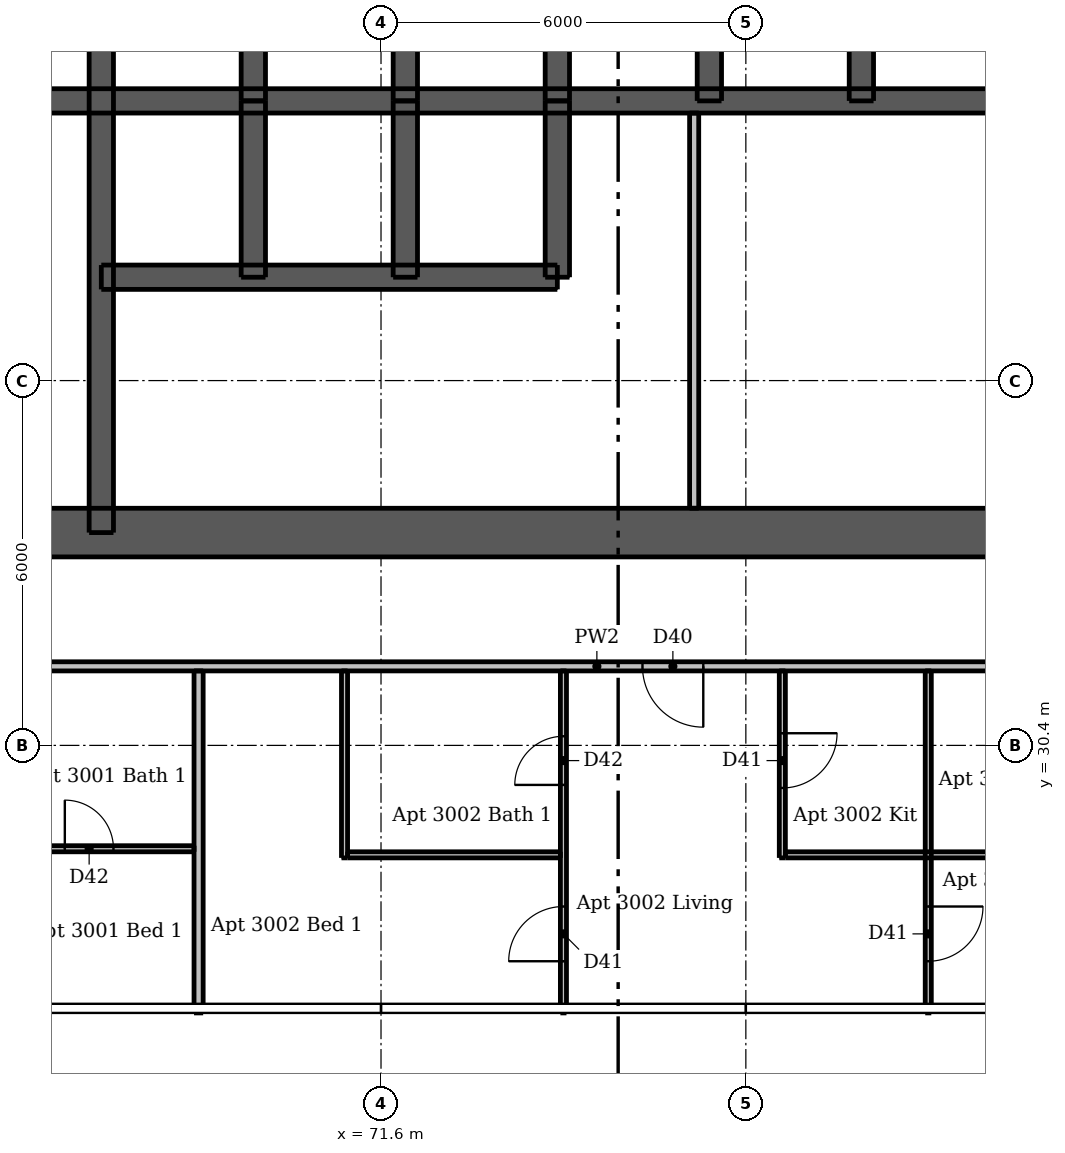
"""IFC4 building model, lengths in metres.
Left out: names, types, materials, properties, quantities, classifications, styles, units other than length and angle.
Written with IfcOpenShell. Run it as: python <this file> out.ifc"""

import sys

from ifc_helpers import new_model, si_unit, direction, frame, frame_2d, origin, place, context, subcontext, project, spatial, rectangle, extrude, element, fill, save


model = new_model("IFC4")
c1 = context("Model", 3, precision=1e-05, world=origin(), true_north=direction((0.0, 1.0)))
c2 = subcontext(c1, "Body", "Model", "MODEL_VIEW")
j1 = project(units=[si_unit("LENGTHUNIT", "METRE"), si_unit("PLANEANGLEUNIT", "RADIAN")], contexts=[c1])
p1 = place(None, origin())
s1 = spatial("IfcSite", under=j1, at=p1, CompositionType="ELEMENT")
p2 = place(p1, origin())
s2 = spatial("IfcBuilding", under=s1, at=p2, CompositionType="ELEMENT")
p3 = place(p2, frame((0.0, 0.0, 111.7)))
s3 = spatial("IfcBuildingStorey", under=s2, at=p3, CompositionType="ELEMENT", Elevation=111.7)
p4 = place(p3, frame((62.5, 33.9, 0.0), z_axis=(0.0, 0.0, 1.0), x_axis=(1.0, 0.0, 0.0)))
e1 = element("IfcWall", 1, at=p4, inside=s3, PredefinedType="SHEAR", context=c2, shape_type="SweptSolid", body=[
    extrude(rectangle(XDim=24.0, YDim=0.8, at=frame_2d((12.0, 0.0))), origin(), (0.0, 0.0, 1.0), 3.05),
])
p5 = place(p4, frame((2.0, 0.0, 0.0)))
e2 = element("IfcOpeningElement", 2, at=p5, cuts=e1, PredefinedType="OPENING", context=c2, shape_type="SweptSolid", body=[
    extrude(rectangle(XDim=1.1, YDim=2.1, at=frame_2d((0.55, 1.05))), frame((0.0, 0.41, 0.0), z_axis=(0.0, -1.0, 0.0), x_axis=(1.0, 0.0, 0.0)), (0.0, 0.0, 1.0), 0.82),
])
p6 = place(p4, frame((20.9, 0.0, 0.0)))
e3 = element("IfcOpeningElement", 3, at=p6, cuts=e1, PredefinedType="OPENING", context=c2, shape_type="SweptSolid", body=[
    extrude(rectangle(XDim=1.1, YDim=2.1, at=frame_2d((0.55, 1.05))), frame((0.0, 0.41, 0.0), z_axis=(0.0, -1.0, 0.0), x_axis=(1.0, 0.0, 0.0)), (0.0, 0.0, 1.0), 0.82),
])
p7 = place(p4, frame((8.0, 0.0, 0.0)))
e4 = element("IfcOpeningElement", 4, at=p7, cuts=e1, PredefinedType="OPENING", context=c2, shape_type="SweptSolid", body=[
    extrude(rectangle(XDim=1.1, YDim=2.1, at=frame_2d((0.55, 1.05))), frame((0.0, 0.41, 0.0), z_axis=(0.0, -1.0, 0.0), x_axis=(1.0, 0.0, 0.0)), (0.0, 0.0, 1.0), 0.82),
])
p8 = place(p4, frame((16.363, 0.0, 0.0)))
e5 = element("IfcOpeningElement", 5, at=p8, cuts=e1, PredefinedType="OPENING", context=c2, shape_type="SweptSolid", body=[
    extrude(rectangle(XDim=0.9, YDim=2.1, at=frame_2d((0.45, 1.05))), frame((0.0, 0.41, 0.0), z_axis=(0.0, -1.0, 0.0), x_axis=(1.0, 0.0, 0.0)), (0.0, 0.0, 1.0), 0.82),
])
p9 = place(p3, frame((62.9, 41.0, 0.0), z_axis=(0.0, 0.0, 1.0), x_axis=(1.0, 0.0, 0.0)))
e6 = element("IfcWall", 6, at=p9, inside=s3, PredefinedType="SHEAR", context=c2, shape_type="SweptSolid", body=[
    extrude(rectangle(XDim=23.2, YDim=0.4, at=frame_2d((11.6, 0.0))), origin(), (0.0, 0.0, 1.0), 3.05),
])
p10 = place(p3, frame((67.0, 33.9, 0.0), z_axis=(0.0, 0.0, 1.0), x_axis=(0.0, 1.0, 0.0)))
e7 = element("IfcWall", 7, at=p10, inside=s3, PredefinedType="SHEAR", context=c2, shape_type="SweptSolid", body=[
    extrude(rectangle(XDim=10.0, YDim=0.4, at=frame_2d((5.0, 0.0))), origin(), (0.0, 0.0, 1.0), 3.05),
])
p11 = place(p10, frame((0.6, 0.0, 0.0)))
e8 = element("IfcOpeningElement", 8, at=p11, cuts=e7, PredefinedType="OPENING", context=c2, shape_type="SweptSolid", body=[
    extrude(rectangle(XDim=1.1, YDim=2.1, at=frame_2d((0.55, 1.05))), frame((0.0, 0.21, 0.0), z_axis=(0.0, -1.0, 0.0), x_axis=(1.0, 0.0, 0.0)), (0.0, 0.0, 1.0), 0.42),
])
for number, where, z_axis, x_axis in (
    (9, (69.5, 41.0, 0.0), (0.0, 0.0, 1.0), (0.0, 1.0, 0.0)),
    (10, (72.0, 41.0, 0.0), (0.0, 0.0, 1.0), (0.0, 1.0, 0.0)),
    (11, (74.5, 41.0, 0.0), (0.0, 0.0, 1.0), (0.0, 1.0, 0.0)),
    (12, (77.0, 41.0, 0.0), (0.0, 0.0, 1.0), (0.0, 1.0, 0.0)),
    (13, (79.5, 41.0, 0.0), (0.0, 0.0, 1.0), (0.0, 1.0, 0.0)),
):
    element("IfcWall", number, at=place(p3, frame(where, z_axis=z_axis, x_axis=x_axis)), inside=s3, PredefinedType="SHEAR", context=c2, shape_type="SweptSolid", body=[
        extrude(rectangle(XDim=2.9, YDim=0.4, at=frame_2d((1.45, 0.0))), origin(), (0.0, 0.0, 1.0), 3.05),
    ])
p12 = place(p3, frame((67.0, 38.1, 0.0), z_axis=(0.0, 0.0, 1.0), x_axis=(1.0, 0.0, 0.0)))
e14 = element("IfcWall", 14, at=p12, inside=s3, PredefinedType="SHEAR", context=c2, shape_type="SweptSolid", body=[
    extrude(rectangle(XDim=7.5, YDim=0.4, at=frame_2d((3.75, 0.0))), origin(), (0.0, 0.0, 1.0), 3.05),
])
p13 = place(p12, frame((0.7, 0.0, 0.0)))
e15 = element("IfcOpeningElement", 15, at=p13, cuts=e14, PredefinedType="OPENING", context=c2, shape_type="SweptSolid", body=[
    extrude(rectangle(XDim=1.1, YDim=2.1, at=frame_2d((0.55, 1.05))), frame((0.0, 0.21, 0.0), z_axis=(0.0, -1.0, 0.0), x_axis=(1.0, 0.0, 0.0)), (0.0, 0.0, 1.0), 0.42),
])
p14 = place(p12, frame((3.2, 0.0, 0.0)))
e16 = element("IfcOpeningElement", 16, at=p14, cuts=e14, PredefinedType="OPENING", context=c2, shape_type="SweptSolid", body=[
    extrude(rectangle(XDim=1.1, YDim=2.1, at=frame_2d((0.55, 1.05))), frame((0.0, 0.21, 0.0), z_axis=(0.0, -1.0, 0.0), x_axis=(1.0, 0.0, 0.0)), (0.0, 0.0, 1.0), 0.42),
])
p15 = place(p12, frame((5.65, 0.0, 0.0)))
e17 = element("IfcOpeningElement", 17, at=p15, cuts=e14, PredefinedType="OPENING", context=c2, shape_type="SweptSolid", body=[
    extrude(rectangle(XDim=1.2, YDim=2.1, at=frame_2d((0.6, 1.05))), frame((0.0, 0.21, 0.0), z_axis=(0.0, -1.0, 0.0), x_axis=(1.0, 0.0, 0.0)), (0.0, 0.0, 1.0), 0.42),
])
for number, where, z_axis, x_axis in (
    (18, (69.5, 38.1, 0.0), (0.0, 0.0, 1.0), (0.0, 1.0, 0.0)),
    (19, (72.0, 38.1, 0.0), (0.0, 0.0, 1.0), (0.0, 1.0, 0.0)),
    (20, (74.5, 38.1, 0.0), (0.0, 0.0, 1.0), (0.0, 1.0, 0.0)),
):
    element("IfcWall", number, at=place(p3, frame(where, z_axis=z_axis, x_axis=x_axis)), inside=s3, PredefinedType="SHEAR", context=c2, shape_type="SweptSolid", body=[
        extrude(rectangle(XDim=2.9, YDim=0.4, at=frame_2d((1.45, 0.0))), origin(), (0.0, 0.0, 1.0), 3.05),
    ])
p16 = place(p3, frame((76.75, 34.3, 0.0), z_axis=(0.0, 0.0, 1.0), x_axis=(0.0, 1.0, 0.0)))
e21 = element("IfcWall", 21, at=p16, inside=s3, PredefinedType="PLUMBINGWALL", context=c2, shape_type="SweptSolid", body=[
    extrude(rectangle(XDim=6.5, YDim=0.15, at=frame_2d((3.25, 0.0))), origin(), (0.0, 0.0, 1.0), 3.05),
])
p17 = place(p3, frame((71.0, 28.55, 0.0), z_axis=(0.0, 0.0, 1.0), x_axis=(0.0, 1.0, 0.0)))
e22 = element("IfcWall", 22, at=p17, inside=s3, PredefinedType="PARTITIONING", context=c2, shape_type="SweptSolid", body=[
    extrude(rectangle(XDim=3.075, YDim=0.1, at=frame_2d((1.538, 0.0))), origin(), (0.0, 0.0, 1.0), 3.05),
])
p18 = place(p3, frame((74.6, 26.0, 0.0), z_axis=(0.0, 0.0, 1.0), x_axis=(0.0, 1.0, 0.0)))
e23 = element("IfcWall", 23, at=p18, inside=s3, PredefinedType="PARTITIONING", context=c2, shape_type="SweptSolid", body=[
    extrude(rectangle(XDim=5.625, YDim=0.1, at=frame_2d((2.812, 0.0))), origin(), (0.0, 0.0, 1.0), 3.05),
])
p19 = place(p18, frame((0.85, 0.0, 0.0)))
e24 = element("IfcOpeningElement", 24, at=p19, cuts=e23, PredefinedType="OPENING", context=c2, shape_type="SweptSolid", body=[
    extrude(rectangle(XDim=0.9, YDim=2.1, at=frame_2d((0.45, 1.05))), frame((0.0, 0.06, 0.0), z_axis=(0.0, -1.0, 0.0), x_axis=(1.0, 0.0, 0.0)), (0.0, 0.0, 1.0), 0.12),
])
p20 = place(p18, frame((3.75, 0.0, 0.0)))
e25 = element("IfcOpeningElement", 25, at=p20, cuts=e23, PredefinedType="OPENING", context=c2, shape_type="SweptSolid", body=[
    extrude(rectangle(XDim=0.8, YDim=2.1, at=frame_2d((0.4, 1.05))), frame((0.0, 0.06, 0.0), z_axis=(0.0, -1.0, 0.0), x_axis=(1.0, 0.0, 0.0)), (0.0, 0.0, 1.0), 0.12),
])
p21 = place(p3, frame((78.2, 31.625, 0.0), z_axis=(0.0, 0.0, 1.0), x_axis=(0.0, -1.0, 0.0)))
e26 = element("IfcWall", 26, at=p21, inside=s3, PredefinedType="PARTITIONING", context=c2, shape_type="SweptSolid", body=[
    extrude(rectangle(XDim=3.075, YDim=0.1, at=frame_2d((1.538, 0.0))), origin(), (0.0, 0.0, 1.0), 3.05),
])
p22 = place(p21, frame((1.025, 0.0, 0.0)))
e27 = element("IfcOpeningElement", 27, at=p22, cuts=e26, PredefinedType="OPENING", context=c2, shape_type="SweptSolid", body=[
    extrude(rectangle(XDim=0.9, YDim=2.1, at=frame_2d((0.45, 1.05))), frame((0.0, 0.06, 0.0), z_axis=(0.0, -1.0, 0.0), x_axis=(1.0, 0.0, 0.0)), (0.0, 0.0, 1.0), 0.12),
])
p23 = place(p3, frame((80.6, 31.625, 0.0), z_axis=(0.0, 0.0, 1.0), x_axis=(0.0, -1.0, 0.0)))
e28 = element("IfcWall", 28, at=p23, inside=s3, PredefinedType="PARTITIONING", context=c2, shape_type="SweptSolid", body=[
    extrude(rectangle(XDim=5.625, YDim=0.1, at=frame_2d((2.812, 0.0))), origin(), (0.0, 0.0, 1.0), 3.05),
])
p24 = place(p23, frame((3.875, 0.0, 0.0)))
e29 = element("IfcOpeningElement", 29, at=p24, cuts=e28, PredefinedType="OPENING", context=c2, shape_type="SweptSolid", body=[
    extrude(rectangle(XDim=0.9, YDim=2.1, at=frame_2d((0.45, 1.05))), frame((0.0, 0.06, 0.0), z_axis=(0.0, -1.0, 0.0), x_axis=(1.0, 0.0, 0.0)), (0.0, 0.0, 1.0), 0.12),
])
p25 = place(p3, frame((62.65, 28.7, 0.0), z_axis=(0.0, 0.0, 1.0), x_axis=(1.0, 0.0, 0.0)))
e30 = element("IfcWall", 30, at=p25, inside=s3, PredefinedType="PARTITIONING", context=c2, shape_type="SweptSolid", body=[
    extrude(rectangle(XDim=5.875, YDim=0.1, at=frame_2d((2.938, 0.0))), origin(), (0.0, 0.0, 1.0), 3.05),
])
p26 = place(p25, frame((3.75, 0.0, 0.0)))
e31 = element("IfcOpeningElement", 31, at=p26, cuts=e30, PredefinedType="OPENING", context=c2, shape_type="SweptSolid", body=[
    extrude(rectangle(XDim=0.8, YDim=2.1, at=frame_2d((0.4, 1.05))), frame((0.0, 0.06, 0.0), z_axis=(0.0, -1.0, 0.0), x_axis=(1.0, 0.0, 0.0)), (0.0, 0.0, 1.0), 0.12),
])
p27 = place(p3, frame((71.05, 28.6, 0.0), z_axis=(0.0, 0.0, 1.0), x_axis=(1.0, 0.0, 0.0)))
e32 = element("IfcWall", 32, at=p27, inside=s3, PredefinedType="PARTITIONING", context=c2, shape_type="SweptSolid", body=[
    extrude(rectangle(XDim=3.5, YDim=0.1, at=frame_2d((1.75, 0.0))), origin(), (0.0, 0.0, 1.0), 3.05),
])
p28 = place(p3, frame((78.25, 28.6, 0.0), z_axis=(0.0, 0.0, 1.0), x_axis=(1.0, 0.0, 0.0)))
e33 = element("IfcWall", 33, at=p28, inside=s3, PredefinedType="PARTITIONING", context=c2, shape_type="SweptSolid", body=[
    extrude(rectangle(XDim=5.275, YDim=0.1, at=frame_2d((2.637, 0.0))), origin(), (0.0, 0.0, 1.0), 3.05),
])
p29 = place(p28, frame((3.45, 0.0, 0.0)))
e34 = element("IfcOpeningElement", 34, at=p29, cuts=e33, PredefinedType="OPENING", context=c2, shape_type="SweptSolid", body=[
    extrude(rectangle(XDim=0.8, YDim=2.1, at=frame_2d((0.4, 1.05))), frame((0.0, 0.06, 0.0), z_axis=(0.0, -1.0, 0.0), x_axis=(1.0, 0.0, 0.0)), (0.0, 0.0, 1.0), 0.12),
])
p30 = place(p3, frame((68.6, 26.0, 0.0), z_axis=(0.0, 0.0, 1.0), x_axis=(0.0, 1.0, 0.0)))
e35 = element("IfcWall", 35, at=p30, inside=s3, PredefinedType="PARTITIONING", context=c2, shape_type="SweptSolid", body=[
    extrude(rectangle(XDim=5.625, YDim=0.15, at=frame_2d((2.812, 0.0))), origin(), (0.0, 0.0, 1.0), 3.05),
])
p31 = place(p3, frame((89.525, 31.7, 0.0), z_axis=(0.0, 0.0, 1.0), x_axis=(-1.0, 0.0, 0.0)))
e36 = element("IfcWall", 36, at=p31, inside=s3, PredefinedType="PARTITIONING", context=c2, shape_type="SweptSolid", body=[
    extrude(rectangle(XDim=28.75, YDim=0.15, at=frame_2d((14.375, 0.0))), origin(), (0.0, 0.0, 1.0), 3.05),
])
p32 = place(p31, frame((27.375, 0.0, 0.0)))
e37 = element("IfcOpeningElement", 37, at=p32, cuts=e36, PredefinedType="OPENING", context=c2, shape_type="SweptSolid", body=[
    extrude(rectangle(XDim=1.0, YDim=2.1, at=frame_2d((0.5, 1.05))), frame((0.0, 0.085, 0.0), z_axis=(0.0, -1.0, 0.0), x_axis=(1.0, 0.0, 0.0)), (0.0, 0.0, 1.0), 0.17),
])
p33 = place(p31, frame((12.625, 0.0, 0.0)))
e38 = element("IfcOpeningElement", 38, at=p33, cuts=e36, PredefinedType="OPENING", context=c2, shape_type="SweptSolid", body=[
    extrude(rectangle(XDim=1.0, YDim=2.1, at=frame_2d((0.5, 1.05))), frame((0.0, 0.085, 0.0), z_axis=(0.0, -1.0, 0.0), x_axis=(1.0, 0.0, 0.0)), (0.0, 0.0, 1.0), 0.17),
])
p34 = place(p31, frame((2.425, 0.0, 0.0)))
e39 = element("IfcOpeningElement", 39, at=p34, cuts=e36, PredefinedType="OPENING", context=c2, shape_type="SweptSolid", body=[
    extrude(rectangle(XDim=1.0, YDim=2.1, at=frame_2d((0.5, 1.05))), frame((0.0, 0.085, 0.0), z_axis=(0.0, -1.0, 0.0), x_axis=(1.0, 0.0, 0.0)), (0.0, 0.0, 1.0), 0.17),
])
p35 = place(p7, origin())
e40 = element("IfcDoor", 40, at=p35, inside=s3, OperationType="SINGLE_SWING_LEFT", PredefinedType="DOOR", context=c2, shape_type="SweptSolid", body=[
    extrude(rectangle(XDim=1.1, YDim=2.1, at=frame_2d((0.55, 1.05))), frame((0.0, 0.388, 0.0), z_axis=(0.0, -1.0, 0.0), x_axis=(1.0, 0.0, 0.0)), (0.0, 0.0, 1.0), 0.05),
])
fill(e4, e40)
p36 = place(p11, origin())
e41 = element("IfcDoor", 41, at=p36, inside=s3, OperationType="SINGLE_SWING_RIGHT", PredefinedType="DOOR", context=c2, shape_type="SweptSolid", body=[
    extrude(rectangle(XDim=1.1, YDim=2.1, at=frame_2d((0.55, 1.05))), frame((0.0, -0.138, 0.0), z_axis=(0.0, -1.0, 0.0), x_axis=(1.0, 0.0, 0.0)), (0.0, 0.0, 1.0), 0.05),
])
fill(e8, e41)
p37 = place(p8, origin())
e42 = element("IfcDoor", 42, at=p37, inside=s3, OperationType="SINGLE_SWING_LEFT", PredefinedType="DOOR", context=c2, shape_type="SweptSolid", body=[
    extrude(rectangle(XDim=0.9, YDim=2.1, at=frame_2d((0.45, 1.05))), frame((0.0, 0.388, 0.0), z_axis=(0.0, -1.0, 0.0), x_axis=(1.0, 0.0, 0.0)), (0.0, 0.0, 1.0), 0.05),
])
fill(e5, e42)
p38 = place(p13, origin())
e43 = element("IfcDoor", 43, at=p38, inside=s3, OperationType="DOUBLE_DOOR_SLIDING", PredefinedType="DOOR", context=c2, shape_type="SweptSolid", body=[
    extrude(rectangle(XDim=1.1, YDim=2.1, at=frame_2d((0.55, 1.05))), frame((0.0, 0.025, 0.0), z_axis=(0.0, -1.0, 0.0), x_axis=(1.0, 0.0, 0.0)), (0.0, 0.0, 1.0), 0.05),
])
fill(e15, e43)
p39 = place(p14, origin())
e44 = element("IfcDoor", 44, at=p39, inside=s3, OperationType="DOUBLE_DOOR_SLIDING", PredefinedType="DOOR", context=c2, shape_type="SweptSolid", body=[
    extrude(rectangle(XDim=1.1, YDim=2.1, at=frame_2d((0.55, 1.05))), frame((0.0, 0.025, 0.0), z_axis=(0.0, -1.0, 0.0), x_axis=(1.0, 0.0, 0.0)), (0.0, 0.0, 1.0), 0.05),
])
fill(e16, e44)
p40 = place(p15, origin())
e45 = element("IfcDoor", 45, at=p40, inside=s3, OperationType="DOUBLE_DOOR_SLIDING", PredefinedType="DOOR", context=c2, shape_type="SweptSolid", body=[
    extrude(rectangle(XDim=1.2, YDim=2.1, at=frame_2d((0.6, 1.05))), frame((0.0, 0.025, 0.0), z_axis=(0.0, -1.0, 0.0), x_axis=(1.0, 0.0, 0.0)), (0.0, 0.0, 1.0), 0.05),
])
fill(e17, e45)
p41 = place(p26, origin())
e46 = element("IfcDoor", 46, at=p41, inside=s3, OperationType="SINGLE_SWING_LEFT", PredefinedType="DOOR", context=c2, shape_type="SweptSolid", body=[
    extrude(rectangle(XDim=0.8, YDim=2.1, at=frame_2d((0.4, 1.05))), frame((0.0, 0.025, 0.0), z_axis=(0.0, -1.0, 0.0), x_axis=(1.0, 0.0, 0.0)), (0.0, 0.0, 1.0), 0.05),
])
fill(e31, e46)
p42 = place(p33, origin())
e47 = element("IfcDoor", 47, at=p42, inside=s3, OperationType="SINGLE_SWING_LEFT", PredefinedType="DOOR", context=c2, shape_type="SweptSolid", body=[
    extrude(rectangle(XDim=1.0, YDim=2.1, at=frame_2d((0.5, 1.05))), frame((0.0, 0.025, 0.0), z_axis=(0.0, -1.0, 0.0), x_axis=(1.0, 0.0, 0.0)), (0.0, 0.0, 1.0), 0.05),
])
fill(e38, e47)
p43 = place(p22, origin())
e48 = element("IfcDoor", 48, at=p43, inside=s3, OperationType="SINGLE_SWING_LEFT", PredefinedType="DOOR", context=c2, shape_type="SweptSolid", body=[
    extrude(rectangle(XDim=0.9, YDim=2.1, at=frame_2d((0.45, 1.05))), frame((0.0, 0.025, 0.0), z_axis=(0.0, -1.0, 0.0), x_axis=(1.0, 0.0, 0.0)), (0.0, 0.0, 1.0), 0.05),
])
fill(e27, e48)
p44 = place(p19, origin())
e49 = element("IfcDoor", 49, at=p44, inside=s3, OperationType="SINGLE_SWING_LEFT", PredefinedType="DOOR", context=c2, shape_type="SweptSolid", body=[
    extrude(rectangle(XDim=0.9, YDim=2.1, at=frame_2d((0.45, 1.05))), frame((0.0, 0.025, 0.0), z_axis=(0.0, -1.0, 0.0), x_axis=(1.0, 0.0, 0.0)), (0.0, 0.0, 1.0), 0.05),
])
fill(e24, e49)
p45 = place(p20, origin())
e50 = element("IfcDoor", 50, at=p45, inside=s3, OperationType="SINGLE_SWING_LEFT", PredefinedType="DOOR", context=c2, shape_type="SweptSolid", body=[
    extrude(rectangle(XDim=0.8, YDim=2.1, at=frame_2d((0.4, 1.05))), frame((0.0, 0.025, 0.0), z_axis=(0.0, -1.0, 0.0), x_axis=(1.0, 0.0, 0.0)), (0.0, 0.0, 1.0), 0.05),
])
fill(e25, e50)
p46 = place(p24, origin())
e51 = element("IfcDoor", 51, at=p46, inside=s3, OperationType="SINGLE_SWING_LEFT", PredefinedType="DOOR", context=c2, shape_type="SweptSolid", body=[
    extrude(rectangle(XDim=0.9, YDim=2.1, at=frame_2d((0.45, 1.05))), frame((0.0, 0.025, 0.0), z_axis=(0.0, -1.0, 0.0), x_axis=(1.0, 0.0, 0.0)), (0.0, 0.0, 1.0), 0.05),
])
fill(e29, e51)
save(model, sys.argv[1])
